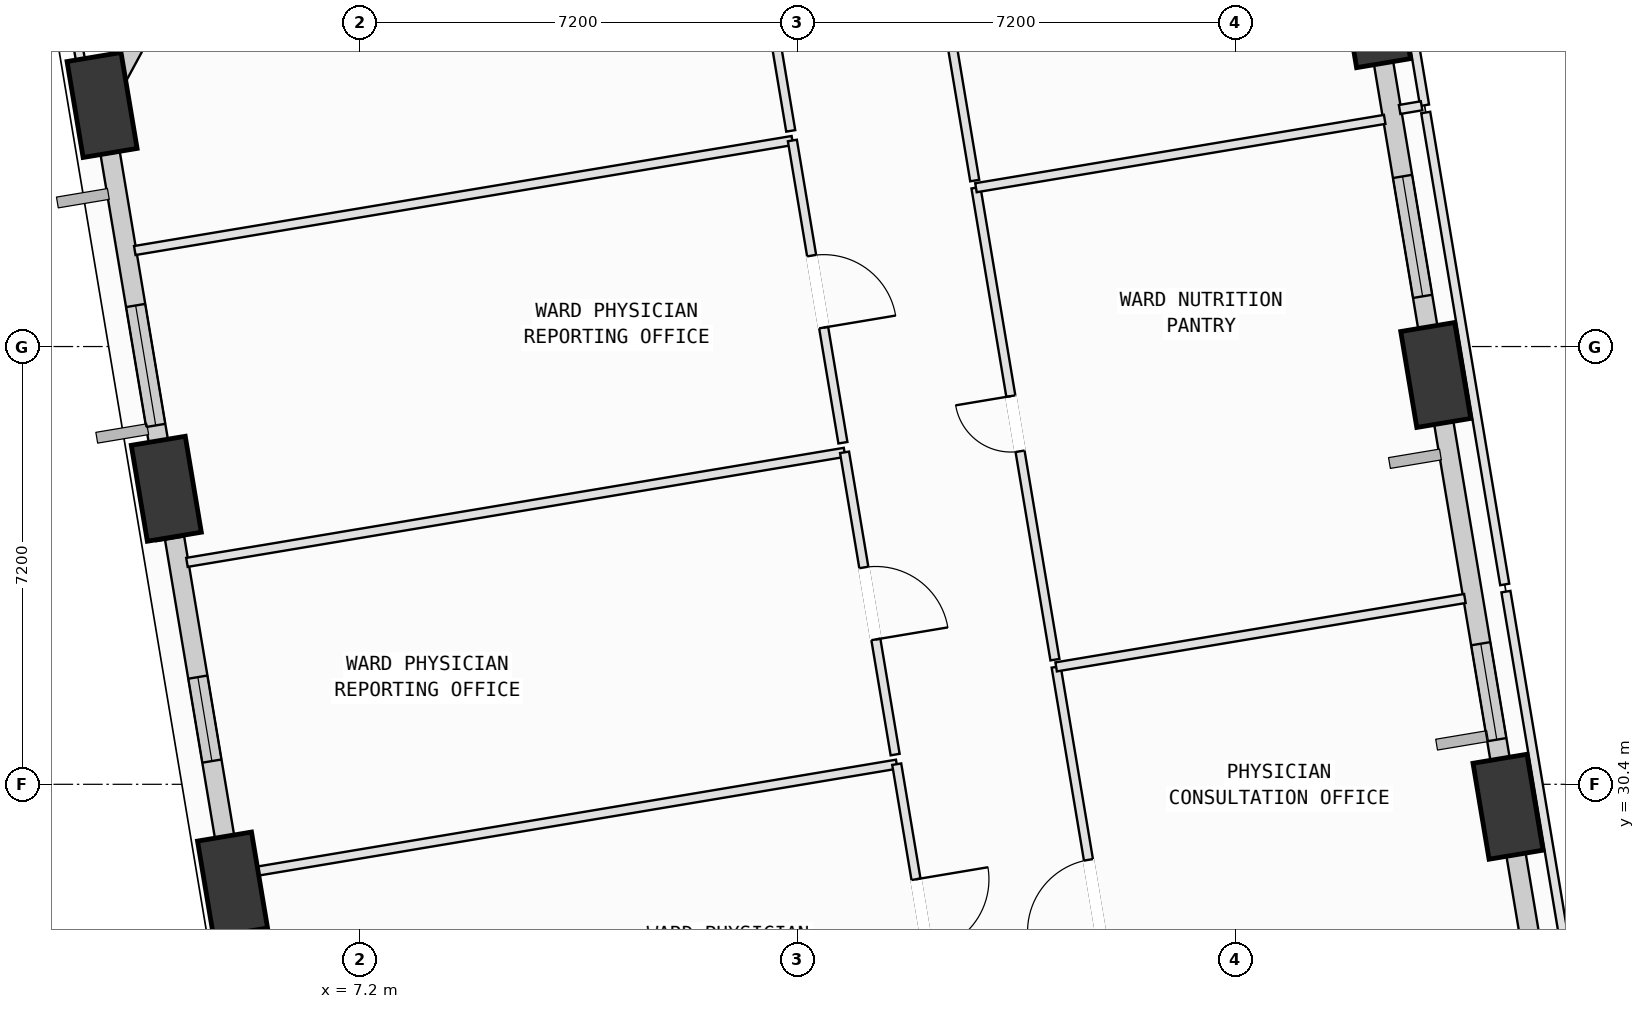
"""IFC4 building model, lengths in metres.
Left out: names, types, materials, properties, quantities, classifications, styles, units other than length and angle.
Written with IfcOpenShell. Run it as: python <this file> out.ifc"""

import sys

from ifc_helpers import new_model, si_unit, direction, frame, frame_2d, origin, origin_2d, place, context, subcontext, project, spatial, rectangle, extrude, element, fill, save


model = new_model("IFC4")
c1 = context("Model", 3, precision=1e-05, world=origin(), true_north=direction((0.0, 1.0)))
c2 = subcontext(c1, "Body", "Model", "MODEL_VIEW")
j1 = project(units=[si_unit("LENGTHUNIT", "METRE"), si_unit("PLANEANGLEUNIT", "RADIAN")], contexts=[c1])
p1 = place(None, origin())
s1 = spatial("IfcSite", under=j1, at=p1, CompositionType="ELEMENT")
p2 = place(p1, origin())
s2 = spatial("IfcBuilding", under=s1, at=p2, CompositionType="ELEMENT")
p3 = place(p2, frame((0.0, 0.0, 63.0)))
s3 = spatial("IfcBuildingStorey", under=s2, at=p3, CompositionType="ELEMENT", Elevation=63.0)
p4 = place(p3, frame((26.083, 30.031, 0.002), z_axis=(-0.021426220941, -0.03131524599, 0.999279876924), x_axis=(0.42032356273, 0.906602224927, 0.037423366641)))
e1 = element("IfcColumn", 1, at=p4, inside=s3, PredefinedType="COLUMN", context=c2, shape_type="SweptSolid", body=[
    extrude(rectangle(XDim=1.6, YDim=0.9, at=origin_2d()), origin(), (0.0, 0.0, 1.0), 4.0),
])
p5 = place(p3, frame((24.895, 37.132, 0.002), z_axis=(-0.050725527972, -0.036398005047, 0.998049150113), x_axis=(0.703550558239, 0.707972386079, 0.061576883259)))
e2 = element("IfcColumn", 2, at=p5, inside=s3, PredefinedType="COLUMN", context=c2, shape_type="SweptSolid", body=[
    extrude(rectangle(XDim=1.6, YDim=0.9, at=origin_2d()), origin(), (0.0, 0.0, 1.0), 4.004),
])
p6 = place(p3, frame((23.905, 43.05, 0.002), z_axis=(-0.075045854901, -0.040657446126, 0.996350887859), x_axis=(0.785410921384, 0.613223631636, 0.084181127184)))
e3 = element("IfcColumn", 3, at=p6, inside=s3, PredefinedType="COLUMN", context=c2, shape_type="SweptSolid", body=[
    extrude(rectangle(XDim=1.6, YDim=0.9, at=origin_2d()), origin(), (0.0, 0.0, 1.0), 4.011),
])
p7 = place(p3, frame((2.961, 41.573, 0.002), z_axis=(-0.06777240471, -0.126234416622, 0.989682662887), x_axis=(0.316301268917, 0.938074881883, 0.141311794492)))
e4 = element("IfcColumn", 4, at=p7, inside=s3, PredefinedType="COLUMN", context=c2, shape_type="SweptSolid", body=[
    extrude(rectangle(XDim=1.6, YDim=0.9, at=origin_2d()), origin(), (0.0, 0.0, 1.0), 4.038),
])
p8 = place(p3, frame((4.018, 35.261, 0.002), z_axis=(-0.041980011788, -0.121941939002, 0.991649051894), x_axis=(0.162308949198, 0.97850739341, 0.12719703633)))
e5 = element("IfcColumn", 5, at=p8, inside=s3, PredefinedType="COLUMN", context=c2, shape_type="SweptSolid", body=[
    extrude(rectangle(XDim=1.6, YDim=0.9, at=origin_2d()), origin(), (0.0, 0.0, 1.0), 4.03),
])
p9 = place(p3, frame((5.107, 28.751, 0.002), z_axis=(-0.015285797262, -0.11737308612, 0.992970242785), x_axis=(-0.03719000177, 0.99246584417, 0.116740960783)))
e6 = element("IfcColumn", 6, at=p9, inside=s3, PredefinedType="COLUMN", context=c2, shape_type="SweptSolid", body=[
    extrude(rectangle(XDim=1.6, YDim=0.9, at=origin_2d()), origin(), (0.0, 0.0, 1.0), 4.025),
])
p10 = place(p3, frame((27.271, 22.933, 0.0), z_axis=(0.0, 0.0, 1.0), x_axis=(-0.165059175066, 0.986283665447, 0.0)))
e7 = element("IfcWall", 7, at=p10, inside=s3, PredefinedType="SOLIDWALL", context=c2, shape_type="SweptSolid", body=[
    extrude(rectangle(XDim=6.536, YDim=0.32, at=frame_2d((3.268, 0.0))), origin(), (0.0, 0.0, 1.0), 2.865),
])
p11 = place(p3, frame((25.993, 30.574, 0.0), z_axis=(0.0, 0.0, 1.0), x_axis=(-0.165052568098, 0.986284771131, 0.0)))
e8 = element("IfcWall", 8, at=p11, inside=s3, PredefinedType="SOLIDWALL", context=c2, shape_type="SweptSolid", body=[
    extrude(rectangle(XDim=5.997, YDim=0.32, at=frame_2d((2.998, 0.0))), origin(), (0.0, 0.0, 1.0), 3.165),
])
p12 = place(p11, frame((0.567, 0.0, 0.75)))
e9 = element("IfcOpeningElement", 9, at=p12, cuts=e8, PredefinedType="OPENING", context=c2, shape_type="SweptSolid", body=[
    extrude(rectangle(XDim=1.6, YDim=1.95, at=frame_2d((0.8, 0.975))), frame((0.0, 0.17, 0.0), z_axis=(0.0, -1.0, 0.0), x_axis=(1.0, 0.0, 0.0)), (0.0, 0.0, 1.0), 0.34),
])
p13 = place(p3, frame((24.806, 37.667, 0.0), z_axis=(0.0, 0.0, 1.0), x_axis=(-0.165048338361, 0.986285478958, 0.0)))
e10 = element("IfcWall", 10, at=p13, inside=s3, PredefinedType="SOLIDWALL", context=c2, shape_type="SweptSolid", body=[
    extrude(rectangle(XDim=4.816, YDim=0.32, at=frame_2d((2.408, 0.0))), origin(), (0.0, 0.0, 1.0), 3.165),
])
p14 = place(p13, frame((0.769, 0.0, 0.75)))
e11 = element("IfcOpeningElement", 11, at=p14, cuts=e10, PredefinedType="OPENING", context=c2, shape_type="SweptSolid", body=[
    extrude(rectangle(XDim=2.0, YDim=1.95, at=frame_2d((1.0, 0.975))), frame((0.0, 0.17, 0.0), z_axis=(0.0, -1.0, 0.0), x_axis=(1.0, 0.0, 0.0)), (0.0, 0.0, 1.0), 0.34),
])
p15 = place(p3, frame((3.113, 41.853, 0.0), z_axis=(0.0, 0.0, 1.0), x_axis=(0.476012817588, 0.879438342064, 0.0)))
e12 = element("IfcWall", 12, at=p15, inside=s3, PredefinedType="SOLIDWALL", context=c2, shape_type="SweptSolid", body=[
    extrude(rectangle(XDim=3.666, YDim=0.32, at=frame_2d((1.833, 0.0))), origin(), (0.0, 0.0, 1.0), 3.165),
])
p16 = place(p3, frame((3.957, 35.622, 0.0), z_axis=(0.0, 0.0, 1.0), x_axis=(-0.165050831886, 0.98628506168, 0.0)))
e13 = element("IfcWall", 13, at=p16, inside=s3, PredefinedType="SOLIDWALL", context=c2, shape_type="SweptSolid", body=[
    extrude(rectangle(XDim=5.223, YDim=0.32, at=frame_2d((2.611, 0.0))), origin(), (0.0, 0.0, 1.0), 3.165),
])
p17 = place(p16, frame((0.69, 0.0, 0.75)))
e14 = element("IfcOpeningElement", 14, at=p17, cuts=e13, PredefinedType="OPENING", context=c2, shape_type="SweptSolid", body=[
    extrude(rectangle(XDim=2.0, YDim=1.95, at=frame_2d((1.0, 0.975))), frame((0.0, 0.17, 0.0), z_axis=(0.0, -1.0, 0.0), x_axis=(1.0, 0.0, 0.0)), (0.0, 0.0, 1.0), 0.34),
])
p18 = place(p3, frame((5.045, 29.122, 0.0), z_axis=(0.0, 0.0, 1.0), x_axis=(-0.165007424724, 0.986292324712, 0.0)))
e15 = element("IfcWall", 15, at=p18, inside=s3, PredefinedType="SOLIDWALL", context=c2, shape_type="SweptSolid", body=[
    extrude(rectangle(XDim=5.4, YDim=0.32, at=frame_2d((2.7, 0.0))), origin(), (0.0, 0.0, 1.0), 3.165),
])
p19 = place(p18, frame((1.683, 0.0, 0.75)))
e16 = element("IfcOpeningElement", 16, at=p19, cuts=e15, PredefinedType="OPENING", context=c2, shape_type="SweptSolid", body=[
    extrude(rectangle(XDim=1.4, YDim=1.85, at=frame_2d((0.7, 0.925))), frame((0.0, 0.17, 0.0), z_axis=(0.0, -1.0, 0.0), x_axis=(1.0, 0.0, 0.0)), (0.0, 0.0, 1.0), 0.34),
])
p20 = place(p3, frame((4.855, 28.861, 0.0), z_axis=(0.0, 0.0, 1.0), x_axis=(0.986288313617, 0.165031398291, 0.0)))
e17 = element("IfcWall", 17, at=p20, inside=s3, PredefinedType="PARTITIONING", context=c2, shape_type="SweptSolid", body=[
    extrude(rectangle(XDim=11.33, YDim=0.15, at=frame_2d((5.665, 0.0))), origin(), (0.0, 0.0, 1.0), 3.78),
])
p21 = place(p3, frame((16.03, 30.731, 0.0), z_axis=(0.0, 0.0, 1.0), x_axis=(0.165113892935, -0.986274506595, 0.0)))
e18 = element("IfcWall", 18, at=p21, inside=s3, PredefinedType="PARTITIONING", context=c2, shape_type="SweptSolid", body=[
    extrude(rectangle(XDim=5.039, YDim=0.15, at=frame_2d((2.52, 0.0))), origin(), (0.0, 0.0, 1.0), 3.78),
])
p22 = place(p21, frame((1.92, 0.0, 0.0)))
e19 = element("IfcOpeningElement", 19, at=p22, cuts=e18, PredefinedType="OPENING", context=c2, shape_type="SweptSolid", body=[
    extrude(rectangle(XDim=1.2, YDim=2.15, at=frame_2d((0.6, 1.075))), frame((0.0, 0.085, 0.0), z_axis=(0.0, -1.0, 0.0), x_axis=(1.0, 0.0, 0.0)), (0.0, 0.0, 1.0), 0.17),
])
p23 = place(p3, frame((5.017, 27.893, 0.0), z_axis=(0.0, 0.0, 1.0), x_axis=(-0.165165334955, 0.98626589322, 0.0)))
e20 = element("IfcWall", 20, at=p23, inside=s3, PredefinedType="PARTITIONING", context=c2, shape_type="SweptSolid", body=[
    extrude(rectangle(XDim=0.981, YDim=0.15, at=frame_2d((0.491, 0.0))), origin(), (0.0, 0.0, 1.0), 3.165),
])
p24 = place(p3, frame((4.357, 34.05, 0.0), z_axis=(0.0, 0.0, 1.0), x_axis=(0.986282376627, 0.165066876009, 0.0)))
e21 = element("IfcWall", 21, at=p24, inside=s3, PredefinedType="PARTITIONING", context=c2, shape_type="SweptSolid", body=[
    extrude(rectangle(XDim=10.966, YDim=0.15, at=frame_2d((5.483, 0.0))), origin(), (0.0, 0.0, 1.0), 3.78),
])
p25 = place(p3, frame((15.172, 35.86, 0.0), z_axis=(0.0, 0.0, 1.0), x_axis=(0.165027335267, -0.986288993457, 0.0)))
e22 = element("IfcWall", 22, at=p25, inside=s3, PredefinedType="PARTITIONING", context=c2, shape_type="SweptSolid", body=[
    extrude(rectangle(XDim=5.04, YDim=0.15, at=frame_2d((2.52, 0.0))), origin(), (0.0, 0.0, 1.0), 3.78),
])
p26 = place(p25, frame((1.92, 0.0, 0.0)))
e23 = element("IfcOpeningElement", 23, at=p26, cuts=e22, PredefinedType="OPENING", context=c2, shape_type="SweptSolid", body=[
    extrude(rectangle(XDim=1.2, YDim=2.15, at=frame_2d((0.6, 1.075))), frame((0.0, 0.085, 0.0), z_axis=(0.0, -1.0, 0.0), x_axis=(1.0, 0.0, 0.0)), (0.0, 0.0, 1.0), 0.17),
])
p27 = place(p3, frame((3.499, 39.179, 0.0), z_axis=(0.0, 0.0, 1.0), x_axis=(0.986281769972, 0.165070500758, 0.0)))
e24 = element("IfcWall", 24, at=p27, inside=s3, PredefinedType="PARTITIONING", context=c2, shape_type="SweptSolid", body=[
    extrude(rectangle(XDim=10.965, YDim=0.15, at=frame_2d((5.483, 0.0))), origin(), (0.0, 0.0, 1.0), 3.78),
])
p28 = place(p3, frame((14.314, 40.989, 0.0), z_axis=(0.0, 0.0, 1.0), x_axis=(0.16489385241, -0.986311318721, 0.0)))
e25 = element("IfcWall", 25, at=p28, inside=s3, PredefinedType="PARTITIONING", context=c2, shape_type="SweptSolid", body=[
    extrude(rectangle(XDim=5.04, YDim=0.15, at=frame_2d((2.52, 0.0))), origin(), (0.0, 0.0, 1.0), 3.78),
])
p29 = place(p28, frame((1.92, 0.0, 0.0)))
e26 = element("IfcOpeningElement", 26, at=p29, cuts=e25, PredefinedType="OPENING", context=c2, shape_type="SweptSolid", body=[
    extrude(rectangle(XDim=1.2, YDim=2.15, at=frame_2d((0.6, 1.075))), frame((0.0, 0.085, 0.0), z_axis=(0.0, -1.0, 0.0), x_axis=(1.0, 0.0, 0.0)), (0.0, 0.0, 1.0), 0.17),
])
p30 = place(p3, frame((3.927, 34.411, 0.0), z_axis=(0.0, 0.0, 1.0), x_axis=(-0.164831702555, 0.986321707068, 0.0)))
e27 = element("IfcWall", 27, at=p30, inside=s3, PredefinedType="PARTITIONING", context=c2, shape_type="SweptSolid", body=[
    extrude(rectangle(XDim=1.189, YDim=0.15, at=frame_2d((0.595, 0.0))), origin(), (0.0, 0.0, 1.0), 3.165),
])
p31 = place(p3, frame((13.455, 46.118, 0.0), z_axis=(0.0, 0.0, 1.0), x_axis=(0.165082339721, -0.986279788454, 0.0)))
e28 = element("IfcWall", 28, at=p31, inside=s3, PredefinedType="PARTITIONING", context=c2, shape_type="SweptSolid", body=[
    extrude(rectangle(XDim=5.04, YDim=0.15, at=frame_2d((2.52, 0.0))), origin(), (0.0, 0.0, 1.0), 2.865),
])
p32 = place(p31, frame((1.92, 0.0, 0.0)))
e29 = element("IfcOpeningElement", 29, at=p32, cuts=e28, PredefinedType="OPENING", context=c2, shape_type="SweptSolid", body=[
    extrude(rectangle(XDim=1.2, YDim=2.15, at=frame_2d((0.6, 1.075))), frame((0.0, 0.085, 0.0), z_axis=(0.0, -1.0, 0.0), x_axis=(1.0, 0.0, 0.0)), (0.0, 0.0, 1.0), 0.17),
])
p33 = place(p3, frame((2.869, 40.736, 0.0), z_axis=(0.0, 0.0, 1.0), x_axis=(-0.165133332046, 0.986271252064, 0.0)))
e30 = element("IfcWall", 30, at=p33, inside=s3, PredefinedType="PARTITIONING", context=c2, shape_type="SweptSolid", body=[
    extrude(rectangle(XDim=2.21, YDim=0.15, at=frame_2d((1.105, 0.0))), origin(), (0.0, 0.0, 1.0), 3.165),
])
p34 = place(p3, frame((19.912, 24.801, 0.0), z_axis=(0.0, 0.0, 1.0), x_axis=(-0.165036777902, 0.986287413455, 0.0)))
e31 = element("IfcWall", 31, at=p34, inside=s3, PredefinedType="PARTITIONING", context=c2, shape_type="SweptSolid", body=[
    extrude(rectangle(XDim=7.635, YDim=0.15, at=frame_2d((3.817, 0.0))), origin(), (0.0, 0.0, 1.0), 3.78),
])
p35 = place(p34, frame((3.217, 0.0, 0.0)))
e32 = element("IfcOpeningElement", 32, at=p35, cuts=e31, PredefinedType="OPENING", context=c2, shape_type="SweptSolid", body=[
    extrude(rectangle(XDim=1.2, YDim=2.15, at=frame_2d((0.6, 1.075))), frame((0.0, 0.085, 0.0), z_axis=(0.0, -1.0, 0.0), x_axis=(1.0, 0.0, 0.0)), (0.0, 0.0, 1.0), 0.17),
])
p36 = place(p3, frame((18.652, 32.331, 0.0), z_axis=(0.0, 0.0, 1.0), x_axis=(0.986282359513, 0.165066978267, 0.0)))
e33 = element("IfcWall", 33, at=p36, inside=s3, PredefinedType="PARTITIONING", context=c2, shape_type="SweptSolid", body=[
    extrude(rectangle(XDim=6.815, YDim=0.15, at=frame_2d((3.408, 0.0))), origin(), (0.0, 0.0, 1.0), 3.78),
])
p37 = place(p3, frame((26.049, 33.569, 0.0), z_axis=(0.0, 0.0, 1.0), x_axis=(0.165036777902, -0.986287413455, 0.0)))
e34 = element("IfcWall", 34, at=p37, inside=s3, PredefinedType="PARTITIONING", context=c2, shape_type="SweptSolid", body=[
    extrude(rectangle(XDim=7.635, YDim=0.15, at=frame_2d((3.817, 0.0))), origin(), (0.0, 0.0, 1.0), 3.78),
])
p38 = place(p3, frame((18.632, 32.45, 0.0), z_axis=(0.0, 0.0, 1.0), x_axis=(-0.165068018391, 0.986282185434, 0.0)))
e35 = element("IfcWall", 35, at=p38, inside=s3, PredefinedType="PARTITIONING", context=c2, shape_type="SweptSolid", body=[
    extrude(rectangle(XDim=7.87, YDim=0.15, at=frame_2d((3.935, 0.0))), origin(), (0.0, 0.0, 1.0), 3.78),
])
p39 = place(p38, frame((3.475, 0.0, 0.0)))
e36 = element("IfcOpeningElement", 36, at=p39, cuts=e35, PredefinedType="OPENING", context=c2, shape_type="SweptSolid", body=[
    extrude(rectangle(XDim=0.92, YDim=2.1, at=frame_2d((0.46, 1.05))), frame((0.0, 0.085, 0.0), z_axis=(0.0, -1.0, 0.0), x_axis=(1.0, 0.0, 0.0)), (0.0, 0.0, 1.0), 0.17),
])
p40 = place(p3, frame((17.333, 40.212, 0.0), z_axis=(0.0, 0.0, 1.0), x_axis=(0.986305677768, 0.164927590181, 0.0)))
e37 = element("IfcWall", 37, at=p40, inside=s3, PredefinedType="PARTITIONING", context=c2, shape_type="SweptSolid", body=[
    extrude(rectangle(XDim=6.815, YDim=0.15, at=frame_2d((3.408, 0.0))), origin(), (0.0, 0.0, 1.0), 3.78),
])
p41 = place(p3, frame((24.73, 41.449, 0.0), z_axis=(0.0, 0.0, 1.0), x_axis=(0.165068018391, -0.986282185434, 0.0)))
e38 = element("IfcWall", 38, at=p41, inside=s3, PredefinedType="PARTITIONING", context=c2, shape_type="SweptSolid", body=[
    extrude(rectangle(XDim=7.87, YDim=0.15, at=frame_2d((3.935, 0.0))), origin(), (0.0, 0.0, 1.0), 3.78),
])
p42 = place(p3, frame((23.639, 47.974, 0.0), z_axis=(0.0, 0.0, 1.0), x_axis=(0.165051162873, -0.986285006291, 0.0)))
e39 = element("IfcWall", 39, at=p42, inside=s3, PredefinedType="PARTITIONING", context=c2, shape_type="SweptSolid", body=[
    extrude(rectangle(XDim=6.495, YDim=0.15, at=frame_2d((3.248, 0.0))), origin(), (0.0, 0.0, 1.0), 3.78),
])
p43 = place(p3, frame((24.662, 41.56, 0.0), z_axis=(0.0, 0.0, 1.0), x_axis=(-0.98601292781, -0.166668851895, 0.0)))
e40 = element("IfcWall", 40, at=p43, inside=s3, PredefinedType="PARTITIONING", context=c2, shape_type="SweptSolid", body=[
    extrude(rectangle(XDim=0.366, YDim=0.15, at=frame_2d((0.183, 0.0))), origin(), (0.0, 0.0, 1.0), 3.78),
])
p44 = place(p3, frame((17.313, 40.33, 0.0), z_axis=(0.0, 0.0, 1.0), x_axis=(-0.164983866738, 0.986296265691, 0.0)))
e41 = element("IfcWall", 41, at=p44, inside=s3, PredefinedType="PARTITIONING", context=c2, shape_type="SweptSolid", body=[
    extrude(rectangle(XDim=7.31, YDim=0.15, at=frame_2d((3.655, 0.0))), origin(), (0.0, 0.0, 1.0), 3.78),
])
p45 = place(p44, frame((3.195, 0.0, 0.0)))
e42 = element("IfcOpeningElement", 42, at=p45, cuts=e41, PredefinedType="OPENING", context=c2, shape_type="SweptSolid", body=[
    extrude(rectangle(XDim=0.92, YDim=2.1, at=frame_2d((0.46, 1.05))), frame((0.0, 0.085, 0.0), z_axis=(0.0, -1.0, 0.0), x_axis=(1.0, 0.0, 0.0)), (0.0, 0.0, 1.0), 0.17),
])
p46 = place(p12, origin())
e43 = element("IfcWindow", 43, at=p46, inside=s3, PartitioningType="SINGLE_PANEL", PredefinedType="WINDOW", context=c2, shape_type="SweptSolid", body=[
    extrude(rectangle(XDim=1.6, YDim=1.95, at=frame_2d((0.8, 0.975))), frame((0.0, 0.03, 0.0), z_axis=(0.0, -1.0, 0.0), x_axis=(1.0, 0.0, 0.0)), (0.0, 0.0, 1.0), 0.06),
])
fill(e9, e43)
p47 = place(p14, origin())
e44 = element("IfcWindow", 44, at=p47, inside=s3, PartitioningType="SINGLE_PANEL", PredefinedType="WINDOW", context=c2, shape_type="SweptSolid", body=[
    extrude(rectangle(XDim=2.0, YDim=1.95, at=frame_2d((1.0, 0.975))), frame((0.0, 0.03, 0.0), z_axis=(0.0, -1.0, 0.0), x_axis=(1.0, 0.0, 0.0)), (0.0, 0.0, 1.0), 0.06),
])
fill(e11, e44)
p48 = place(p17, origin())
e45 = element("IfcWindow", 45, at=p48, inside=s3, PartitioningType="SINGLE_PANEL", PredefinedType="WINDOW", context=c2, shape_type="SweptSolid", body=[
    extrude(rectangle(XDim=2.0, YDim=1.95, at=frame_2d((1.0, 0.975))), frame((0.0, 0.03, 0.0), z_axis=(0.0, -1.0, 0.0), x_axis=(1.0, 0.0, 0.0)), (0.0, 0.0, 1.0), 0.06),
])
fill(e14, e45)
p49 = place(p19, origin())
e46 = element("IfcWindow", 46, at=p49, inside=s3, PartitioningType="SINGLE_PANEL", PredefinedType="WINDOW", context=c2, shape_type="SweptSolid", body=[
    extrude(rectangle(XDim=1.4, YDim=1.85, at=frame_2d((0.7, 0.925))), frame((0.0, 0.03, 0.0), z_axis=(0.0, -1.0, 0.0), x_axis=(1.0, 0.0, 0.0)), (0.0, 0.0, 1.0), 0.06),
])
fill(e16, e46)
p50 = place(p22, origin())
e47 = element("IfcDoor", 47, at=p50, inside=s3, OperationType="SINGLE_SWING_LEFT", PredefinedType="DOOR", context=c2, shape_type="SweptSolid", body=[
    extrude(rectangle(XDim=1.2, YDim=2.15, at=frame_2d((0.6, 1.075))), frame((0.0, 0.025, 0.0), z_axis=(0.0, -1.0, 0.0), x_axis=(1.0, 0.0, 0.0)), (0.0, 0.0, 1.0), 0.05),
])
fill(e19, e47)
p51 = place(p26, origin())
e48 = element("IfcDoor", 48, at=p51, inside=s3, OperationType="SINGLE_SWING_RIGHT", PredefinedType="DOOR", context=c2, shape_type="SweptSolid", body=[
    extrude(rectangle(XDim=1.2, YDim=2.15, at=frame_2d((0.6, 1.075))), frame((0.0, 0.025, 0.0), z_axis=(0.0, -1.0, 0.0), x_axis=(1.0, 0.0, 0.0)), (0.0, 0.0, 1.0), 0.05),
])
fill(e23, e48)
p52 = place(p29, origin())
e49 = element("IfcDoor", 49, at=p52, inside=s3, OperationType="SINGLE_SWING_RIGHT", PredefinedType="DOOR", context=c2, shape_type="SweptSolid", body=[
    extrude(rectangle(XDim=1.2, YDim=2.15, at=frame_2d((0.6, 1.075))), frame((0.0, 0.025, 0.0), z_axis=(0.0, -1.0, 0.0), x_axis=(1.0, 0.0, 0.0)), (0.0, 0.0, 1.0), 0.05),
])
fill(e26, e49)
p53 = place(p35, origin())
e50 = element("IfcDoor", 50, at=p53, inside=s3, OperationType="SINGLE_SWING_LEFT", PredefinedType="DOOR", context=c2, shape_type="SweptSolid", body=[
    extrude(rectangle(XDim=1.2, YDim=2.15, at=frame_2d((0.6, 1.075))), frame((0.0, 0.025, 0.0), z_axis=(0.0, -1.0, 0.0), x_axis=(1.0, 0.0, 0.0)), (0.0, 0.0, 1.0), 0.05),
])
fill(e32, e50)
p54 = place(p39, origin())
e51 = element("IfcDoor", 51, at=p54, inside=s3, OperationType="SINGLE_SWING_RIGHT", PredefinedType="DOOR", context=c2, shape_type="SweptSolid", body=[
    extrude(rectangle(XDim=0.92, YDim=2.1, at=frame_2d((0.46, 1.05))), frame((0.0, 0.025, 0.0), z_axis=(0.0, -1.0, 0.0), x_axis=(1.0, 0.0, 0.0)), (0.0, 0.0, 1.0), 0.05),
])
fill(e36, e51)
save(model, sys.argv[1])
